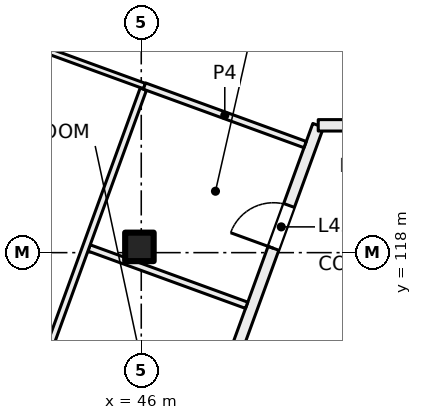
"""IFC4 building model, lengths in metres.
Left out: names, types, materials, properties, quantities, classifications, styles, units other than length and angle.
Written with IfcOpenShell. Run it as: python <this file> out.ifc"""

import sys

from ifc_helpers import new_model, si_unit, direction, frame, frame_2d, origin, origin_2d, place, context, subcontext, project, spatial, rectangle, extrude, element, fill, save


model = new_model("IFC4")
c1 = context("Model", 3, precision=1e-05, world=origin(), true_north=direction((0.0, 1.0)))
c2 = subcontext(c1, "Body", "Model", "MODEL_VIEW")
j1 = project(units=[si_unit("LENGTHUNIT", "METRE"), si_unit("PLANEANGLEUNIT", "RADIAN")], contexts=[c1])
p1 = place(None, origin())
s1 = spatial("IfcSite", under=j1, at=p1, CompositionType="ELEMENT")
p2 = place(p1, origin())
s2 = spatial("IfcBuilding", under=s1, at=p2, CompositionType="ELEMENT")
p3 = place(p2, frame((0.0, 0.0, 192.0)))
s3 = spatial("IfcBuildingStorey", under=s2, at=p3, CompositionType="ELEMENT", Elevation=192.0)
p4 = place(p3, frame((45.952, 118.152, 0.0), z_axis=(0.0, 0.0, 1.0), x_axis=(1.0, 0.0, 0.0)))
e1 = element("IfcColumn", 1, at=p4, inside=s3, PredefinedType="COLUMN", context=c2, shape_type="SweptSolid", body=[
    extrude(rectangle(XDim=0.75, YDim=0.75, at=origin_2d()), origin(), (0.0, 0.0, 1.0), 4.0),
])
p5 = place(p3, frame((34.431, 126.624, 0.0), z_axis=(0.0, 0.0, 1.0), x_axis=(0.939703144457, -0.341991228392, 0.0)))
e2 = element("IfcWall", 2, at=p5, inside=s3, PredefinedType="PARTITIONING", context=c2, shape_type="SweptSolid", body=[
    extrude(rectangle(XDim=12.401, YDim=0.15, at=frame_2d((6.2, 0.0))), origin(), (0.0, 0.0, 1.0), 3.625),
])
p6 = place(p3, frame((42.732, 99.579, 0.0), z_axis=(0.0, 0.0, 1.0), x_axis=(0.342053589012, 0.939680446877, 0.0)))
e3 = element("IfcWall", 3, at=p6, inside=s3, PredefinedType="PARTITIONING", context=c2, shape_type="SweptSolid", body=[
    extrude(rectangle(XDim=23.166, YDim=0.3, at=frame_2d((11.583, 0.0))), origin(), (0.0, 0.0, 1.0), 3.625),
])
p7 = place(p6, frame((15.225, 0.0, 0.0)))
e4 = element("IfcOpeningElement", 4, at=p7, cuts=e3, PredefinedType="OPENING", context=c2, shape_type="SweptSolid", body=[
    extrude(rectangle(XDim=1.2, YDim=2.1, at=frame_2d((0.6, 1.05))), frame((0.0, 0.16, 0.0), z_axis=(0.0, -1.0, 0.0), x_axis=(1.0, 0.0, 0.0)), (0.0, 0.0, 1.0), 0.32),
])
p8 = place(p6, frame((19.725, 0.0, 0.0)))
e5 = element("IfcOpeningElement", 5, at=p8, cuts=e3, PredefinedType="OPENING", context=c2, shape_type="SweptSolid", body=[
    extrude(rectangle(XDim=1.2, YDim=2.1, at=frame_2d((0.6, 1.05))), frame((0.0, 0.16, 0.0), z_axis=(0.0, -1.0, 0.0), x_axis=(1.0, 0.0, 0.0)), (0.0, 0.0, 1.0), 0.32),
])
p9 = place(p6, frame((5.925, 0.0, 0.0)))
e6 = element("IfcOpeningElement", 6, at=p9, cuts=e3, PredefinedType="OPENING", context=c2, shape_type="SweptSolid", body=[
    extrude(rectangle(XDim=1.8, YDim=2.1, at=frame_2d((0.9, 1.05))), frame((0.0, 0.16, 0.0), z_axis=(0.0, -1.0, 0.0), x_axis=(1.0, 0.0, 0.0)), (0.0, 0.0, 1.0), 0.32),
])
p10 = place(p3, frame((44.627, 118.124, 0.0), z_axis=(0.0, 0.0, 1.0), x_axis=(0.939691598517, -0.342022951975, 0.0)))
e7 = element("IfcWall", 7, at=p10, inside=s3, PredefinedType="PARTITIONING", context=c2, shape_type="SweptSolid", body=[
    extrude(rectangle(XDim=4.412, YDim=0.175, at=frame_2d((2.206, 0.0))), origin(), (0.0, 0.0, 1.0), 3.625),
])
p11 = place(p3, frame((46.054, 122.301, 0.0), z_axis=(0.0, 0.0, 1.0), x_axis=(-0.341963022424, -0.939713409128, 0.0)))
e8 = element("IfcWall", 8, at=p11, inside=s3, PredefinedType="PARTITIONING", context=c2, shape_type="SweptSolid", body=[
    extrude(rectangle(XDim=9.001, YDim=0.175, at=frame_2d((4.5, 0.0))), origin(), (0.0, 0.0, 1.0), 3.625),
])
p12 = place(p3, frame((50.312, 120.843, 0.0), z_axis=(0.0, 0.0, 1.0), x_axis=(-0.939609529273, 0.342248349154, 0.0)))
e9 = element("IfcWall", 9, at=p12, inside=s3, PredefinedType="PARTITIONING", context=c2, shape_type="SweptSolid", body=[
    extrude(rectangle(XDim=4.5, YDim=0.175, at=frame_2d((2.25, 0.0))), origin(), (0.0, 0.0, 1.0), 3.625),
])
p13 = place(p3, frame((50.657, 121.35, 0.0), z_axis=(0.0, 0.0, 1.0), x_axis=(1.0, 0.0, 0.0)))
e10 = element("IfcWall", 10, at=p13, inside=s3, PredefinedType="PARTITIONING", context=c2, shape_type="SweptSolid", body=[
    extrude(rectangle(XDim=35.096, YDim=0.3, at=frame_2d((17.548, 0.0))), origin(), (0.0, 0.0, 1.0), 3.625),
])
p14 = place(p13, frame((27.093, 0.0, 0.0)))
e11 = element("IfcOpeningElement", 11, at=p14, cuts=e10, PredefinedType="OPENING", context=c2, shape_type="SweptSolid", body=[
    extrude(rectangle(XDim=1.0, YDim=2.1, at=frame_2d((0.5, 1.05))), frame((0.0, 0.16, 0.0), z_axis=(0.0, -1.0, 0.0), x_axis=(1.0, 0.0, 0.0)), (0.0, 0.0, 1.0), 0.32),
])
p15 = place(p13, frame((23.243, 0.0, 0.0)))
e12 = element("IfcOpeningElement", 12, at=p15, cuts=e10, PredefinedType="OPENING", context=c2, shape_type="SweptSolid", body=[
    extrude(rectangle(XDim=1.2, YDim=2.1, at=frame_2d((0.6, 1.05))), frame((0.0, 0.16, 0.0), z_axis=(0.0, -1.0, 0.0), x_axis=(1.0, 0.0, 0.0)), (0.0, 0.0, 1.0), 0.32),
])
p16 = place(p13, frame((31.943, 0.0, 0.0)))
e13 = element("IfcOpeningElement", 13, at=p16, cuts=e10, PredefinedType="OPENING", context=c2, shape_type="SweptSolid", body=[
    extrude(rectangle(XDim=1.8, YDim=2.1, at=frame_2d((0.9, 1.05))), frame((0.0, 0.16, 0.0), z_axis=(0.0, -1.0, 0.0), x_axis=(1.0, 0.0, 0.0)), (0.0, 0.0, 1.0), 0.32),
])
p17 = place(p13, frame((16.593, 0.0, 0.0)))
e14 = element("IfcOpeningElement", 14, at=p17, cuts=e10, PredefinedType="OPENING", context=c2, shape_type="SweptSolid", body=[
    extrude(rectangle(XDim=1.0, YDim=2.1, at=frame_2d((0.5, 1.05))), frame((0.0, 0.16, 0.0), z_axis=(0.0, -1.0, 0.0), x_axis=(1.0, 0.0, 0.0)), (0.0, 0.0, 1.0), 0.32),
])
p18 = place(p13, frame((7.193, 0.0, 0.0)))
e15 = element("IfcOpeningElement", 15, at=p18, cuts=e10, PredefinedType="OPENING", context=c2, shape_type="SweptSolid", body=[
    extrude(rectangle(XDim=1.8, YDim=2.1, at=frame_2d((0.9, 1.05))), frame((0.0, 0.16, 0.0), z_axis=(0.0, -1.0, 0.0), x_axis=(1.0, 0.0, 0.0)), (0.0, 0.0, 1.0), 0.32),
])
p19 = place(p13, frame((0.896, 0.0, 0.0)))
e16 = element("IfcOpeningElement", 16, at=p19, cuts=e10, PredefinedType="OPENING", context=c2, shape_type="SweptSolid", body=[
    extrude(rectangle(XDim=1.8, YDim=2.1, at=frame_2d((0.9, 1.05))), frame((0.0, 0.16, 0.0), z_axis=(0.0, -1.0, 0.0), x_axis=(1.0, 0.0, 0.0)), (0.0, 0.0, 1.0), 0.32),
])
p20 = place(p8, origin())
e17 = element("IfcDoor", 17, at=p20, inside=s3, OperationType="DOUBLE_DOOR_SINGLE_SWING", PredefinedType="DOOR", context=c2, shape_type="SweptSolid", body=[
    extrude(rectangle(XDim=1.2, YDim=2.1, at=frame_2d((0.6, 1.05))), frame((0.0, 0.025, 0.0), z_axis=(0.0, -1.0, 0.0), x_axis=(1.0, 0.0, 0.0)), (0.0, 0.0, 1.0), 0.05),
])
fill(e5, e17)
save(model, sys.argv[1])
